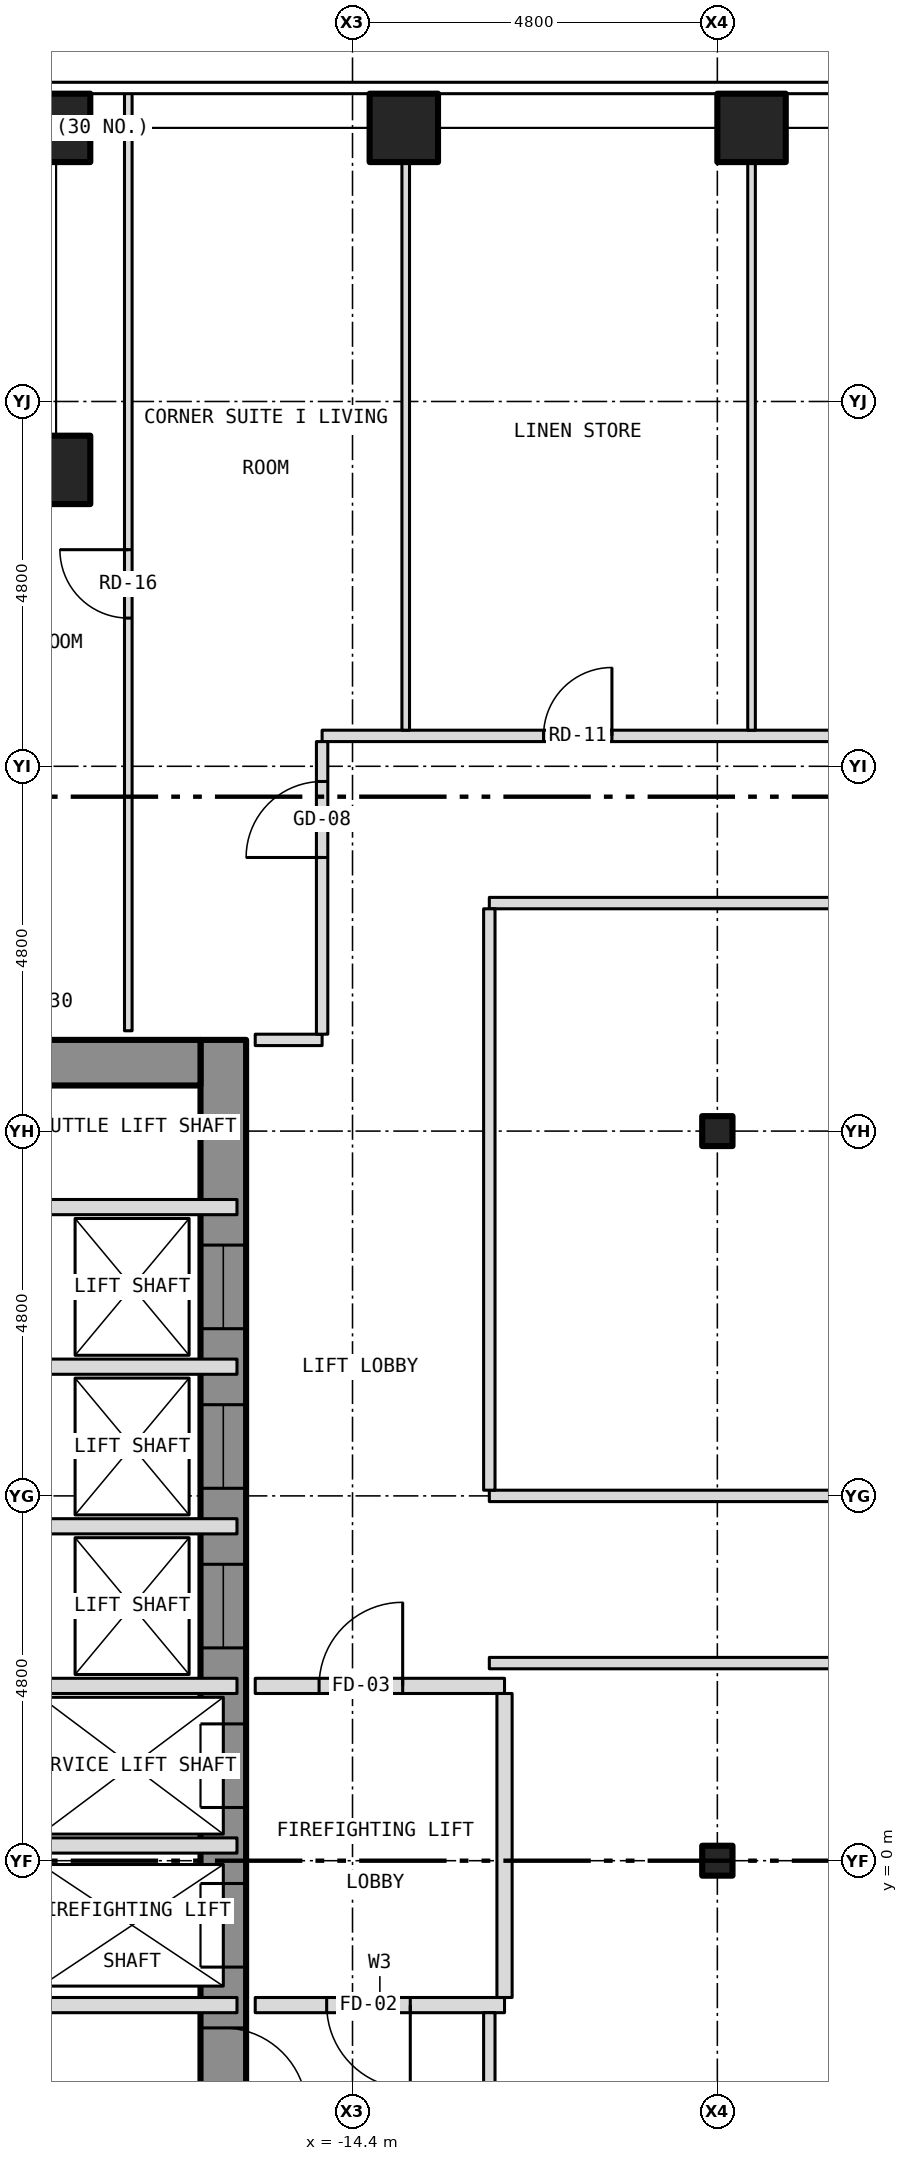
"""IFC4 building model, lengths in metres.
Left out: names, types, materials, properties, quantities, classifications, styles, units other than length and angle.
Written with IfcOpenShell. Run it as: python <this file> out.ifc"""

import sys

from ifc_helpers import new_model, si_unit, direction, frame, frame_2d, origin, origin_2d, place, context, subcontext, project, spatial, rectangle, hollow_rectangle, i_section, extrude, element, fill, save


model = new_model("IFC4")
c1 = context("Model", 3, precision=1e-05, world=origin(), true_north=direction((0.0, 1.0)))
c2 = subcontext(c1, "Body", "Model", "MODEL_VIEW")
j1 = project(units=[si_unit("LENGTHUNIT", "METRE"), si_unit("PLANEANGLEUNIT", "RADIAN")], contexts=[c1])
p1 = place(None, origin())
s1 = spatial("IfcSite", under=j1, at=p1, CompositionType="ELEMENT")
p2 = place(p1, origin())
s2 = spatial("IfcBuilding", under=s1, at=p2, CompositionType="ELEMENT")
p3 = place(p2, frame((0.0, 0.0, 110.0)))
s3 = spatial("IfcBuildingStorey", under=s2, at=p3, CompositionType="ELEMENT", Elevation=110.0)
for number, where, z_axis, x_axis in (
    (1, (-18.3, 22.8, -0.15), (0.0, 0.0, 1.0), (1.0, 0.0, 0.0)),
    (2, (-13.725, 22.8, -0.15), (0.0, 0.0, 1.0), (1.0, 0.0, 0.0)),
    (3, (-9.15, 22.8, -0.15), (0.0, 0.0, 1.0), (1.0, 0.0, 0.0)),
    (4, (-18.3, 18.3, -0.15), (0.0, 0.0, 1.0), (1.0, 0.0, 0.0)),
):
    element("IfcColumn", number, at=place(p3, frame(where, z_axis=z_axis, x_axis=x_axis)), inside=s3, PredefinedType="COLUMN", context=c2, shape_type="SweptSolid", body=[
        extrude(hollow_rectangle(XDim=0.9, YDim=0.9, WallThickness=0.05, at=origin_2d()), origin(), (0.0, 0.0, 1.0), 3.5),
    ])
for number, where, z_axis, x_axis in (
    (5, (-9.6, 0.0, -0.15), (0.0, 0.0, 1.0), (1.0, 0.0, 0.0)),
    (6, (-9.6, 9.6, -0.15), (0.0, 0.0, 1.0), (1.0, 0.0, 0.0)),
):
    element("IfcColumn", number, at=place(p3, frame(where, z_axis=z_axis, x_axis=x_axis)), inside=s3, PredefinedType="COLUMN", context=c2, shape_type="SweptSolid", body=[
        extrude(i_section(OverallWidth=0.399, OverallDepth=0.394, WebThickness=0.023, FlangeThickness=0.037, at=origin_2d()), origin(), (0.0, 0.0, 1.0), 3.5),
    ])
p4 = place(p3, frame((-16.1, -10.8, 0.0), z_axis=(0.0, 0.0, 1.0), x_axis=(0.0, 1.0, 0.0)))
e7 = element("IfcWall", 7, at=p4, inside=s3, PredefinedType="SHEAR", context=c2, shape_type="SweptSolid", body=[
    extrude(rectangle(XDim=21.6, YDim=0.6, at=frame_2d((10.8, 0.0))), origin(), (0.0, 0.0, 1.0), 3.25),
])
p5 = place(p4, frame((9.4, 0.0, 0.0)))
e8 = element("IfcOpeningElement", 8, at=p5, cuts=e7, PredefinedType="OPENING", context=c2, shape_type="SweptSolid", body=[
    extrude(rectangle(XDim=1.1, YDim=2.1, at=frame_2d((0.55, 1.05))), frame((0.0, 0.312, 0.0), z_axis=(0.0, -1.0, 0.0), x_axis=(1.0, 0.0, 0.0)), (0.0, 0.0, 1.0), 0.624),
])
p6 = place(p4, frame((11.5, 0.0, 0.0)))
e9 = element("IfcOpeningElement", 9, at=p6, cuts=e7, PredefinedType="OPENING", context=c2, shape_type="SweptSolid", body=[
    extrude(rectangle(XDim=1.1, YDim=2.1, at=frame_2d((0.55, 1.05))), frame((0.0, 0.312, 0.0), z_axis=(0.0, -1.0, 0.0), x_axis=(1.0, 0.0, 0.0)), (0.0, 0.0, 1.0), 0.624),
])
p7 = place(p4, frame((13.6, 0.0, 0.0)))
e10 = element("IfcOpeningElement", 10, at=p7, cuts=e7, PredefinedType="OPENING", context=c2, shape_type="SweptSolid", body=[
    extrude(rectangle(XDim=1.1, YDim=2.1, at=frame_2d((0.55, 1.05))), frame((0.0, 0.312, 0.0), z_axis=(0.0, -1.0, 0.0), x_axis=(1.0, 0.0, 0.0)), (0.0, 0.0, 1.0), 0.624),
])
p8 = place(p4, frame((15.7, 0.0, 0.0)))
e11 = element("IfcOpeningElement", 11, at=p8, cuts=e7, PredefinedType="OPENING", context=c2, shape_type="SweptSolid", body=[
    extrude(rectangle(XDim=1.1, YDim=2.1, at=frame_2d((0.55, 1.05))), frame((0.0, 0.312, 0.0), z_axis=(0.0, -1.0, 0.0), x_axis=(1.0, 0.0, 0.0)), (0.0, 0.0, 1.0), 0.624),
])
p9 = place(p4, frame((17.8, 0.0, 0.0)))
e12 = element("IfcOpeningElement", 12, at=p9, cuts=e7, PredefinedType="OPENING", context=c2, shape_type="SweptSolid", body=[
    extrude(rectangle(XDim=1.1, YDim=2.1, at=frame_2d((0.55, 1.05))), frame((0.0, 0.312, 0.0), z_axis=(0.0, -1.0, 0.0), x_axis=(1.0, 0.0, 0.0)), (0.0, 0.0, 1.0), 0.624),
])
p10 = place(p4, frame((0.758, 0.0, 0.0)))
e13 = element("IfcOpeningElement", 13, at=p10, cuts=e7, PredefinedType="OPENING", context=c2, shape_type="SweptSolid", body=[
    extrude(rectangle(XDim=1.1, YDim=2.1, at=frame_2d((0.55, 1.05))), frame((0.0, 0.312, 0.0), z_axis=(0.0, -1.0, 0.0), x_axis=(1.0, 0.0, 0.0)), (0.0, 0.0, 1.0), 0.624),
])
p11 = place(p4, frame((7.5, 0.0, 0.0)))
e14 = element("IfcOpeningElement", 14, at=p11, cuts=e7, PredefinedType="OPENING", context=c2, shape_type="SweptSolid", body=[
    extrude(rectangle(XDim=1.1, YDim=2.1, at=frame_2d((0.55, 1.05))), frame((0.0, 0.312, 0.0), z_axis=(0.0, -1.0, 0.0), x_axis=(1.0, 0.0, 0.0)), (0.0, 0.0, 1.0), 0.624),
])
p12 = place(p3, frame((-22.2, 10.5, 0.0), z_axis=(0.0, 0.0, 1.0), x_axis=(1.0, 0.0, 0.0)))
e15 = element("IfcWall", 15, at=p12, inside=s3, PredefinedType="SHEAR", context=c2, shape_type="SweptSolid", body=[
    extrude(rectangle(XDim=5.8, YDim=0.6, at=frame_2d((2.9, 0.0))), origin(), (0.0, 0.0, 1.0), 3.25),
])
p13 = place(p3, frame((-22.68, -1.9, 0.0), z_axis=(0.0, 0.0, 1.0), x_axis=(1.0, 0.0, 0.0)))
e16 = element("IfcWall", 16, at=p13, inside=s3, PredefinedType="PARTITIONING", context=c2, shape_type="SweptSolid", body=[
    extrude(rectangle(XDim=6.76, YDim=0.2, at=frame_2d((3.38, 0.0))), origin(), (0.0, 0.0, 1.0), 3.25),
])
p14 = place(p13, frame((2.12, 0.0, 0.0)))
e17 = element("IfcOpeningElement", 17, at=p14, cuts=e16, PredefinedType="OPENING", context=c2, shape_type="SweptSolid", body=[
    extrude(rectangle(XDim=0.9, YDim=2.1, at=frame_2d((0.45, 1.05))), frame((0.0, 0.112, 0.0), z_axis=(0.0, -1.0, 0.0), x_axis=(1.0, 0.0, 0.0)), (0.0, 0.0, 1.0), 0.224),
])
p15 = place(p3, frame((-15.68, -1.9, 0.0), z_axis=(0.0, 0.0, 1.0), x_axis=(1.0, 0.0, 0.0)))
e18 = element("IfcWall", 18, at=p15, inside=s3, PredefinedType="PARTITIONING", context=c2, shape_type="SweptSolid", body=[
    extrude(rectangle(XDim=3.28, YDim=0.2, at=frame_2d((1.64, 0.0))), origin(), (0.0, 0.0, 1.0), 3.35),
])
p16 = place(p15, frame((0.94, 0.0, 0.0)))
e19 = element("IfcOpeningElement", 19, at=p16, cuts=e18, PredefinedType="OPENING", context=c2, shape_type="SweptSolid", body=[
    extrude(rectangle(XDim=1.1, YDim=2.1, at=frame_2d((0.55, 1.05))), frame((0.0, 0.112, 0.0), z_axis=(0.0, -1.0, 0.0), x_axis=(1.0, 0.0, 0.0)), (0.0, 0.0, 1.0), 0.224),
])
for number, where, z_axis, x_axis in (
    (20, (-18.8, 0.2, 0.0), (0.0, 0.0, 1.0), (1.0, 0.0, 0.0)),
    (21, (-18.8, 2.3, 0.0), (0.0, 0.0, 1.0), (1.0, 0.0, 0.0)),
):
    element("IfcWall", number, at=place(p3, frame(where, z_axis=z_axis, x_axis=x_axis)), inside=s3, PredefinedType="PARTITIONING", context=c2, shape_type="SweptSolid", body=[
        extrude(rectangle(XDim=2.88, YDim=0.2, at=frame_2d((1.44, 0.0))), origin(), (0.0, 0.0, 1.0), 3.25),
    ])
p17 = place(p3, frame((-15.68, 2.3, 0.0), z_axis=(0.0, 0.0, 1.0), x_axis=(1.0, 0.0, 0.0)))
e22 = element("IfcWall", 22, at=p17, inside=s3, PredefinedType="PARTITIONING", context=c2, shape_type="SweptSolid", body=[
    extrude(rectangle(XDim=3.28, YDim=0.2, at=frame_2d((1.64, 0.0))), origin(), (0.0, 0.0, 1.0), 3.35),
])
p18 = place(p17, frame((0.84, 0.0, 0.0)))
e23 = element("IfcOpeningElement", 23, at=p18, cuts=e22, PredefinedType="OPENING", context=c2, shape_type="SweptSolid", body=[
    extrude(rectangle(XDim=1.1, YDim=2.1, at=frame_2d((0.55, 1.05))), frame((0.0, 0.112, 0.0), z_axis=(0.0, -1.0, 0.0), x_axis=(1.0, 0.0, 0.0)), (0.0, 0.0, 1.0), 0.224),
])
p19 = place(p3, frame((-12.6, 2.6, 0.0), z_axis=(0.0, 0.0, 1.0), x_axis=(1.0, 0.0, 0.0)))
e24 = element("IfcWall", 24, at=p19, inside=s3, PredefinedType="PARTITIONING", context=c2, shape_type="SweptSolid", body=[
    extrude(rectangle(XDim=16.7, YDim=0.15, at=frame_2d((8.35, 0.0))), origin(), (0.0, 0.0, 1.0), 3.35),
])
p20 = place(p19, frame((5.85, 0.0, 0.0)))
e25 = element("IfcOpeningElement", 25, at=p20, cuts=e24, PredefinedType="OPENING", context=c2, shape_type="SweptSolid", body=[
    extrude(rectangle(XDim=0.9, YDim=2.1, at=frame_2d((0.45, 1.05))), frame((0.0, 0.087, 0.0), z_axis=(0.0, -1.0, 0.0), x_axis=(1.0, 0.0, 0.0)), (0.0, 0.0, 1.0), 0.174),
])
p21 = place(p3, frame((-18.8, 4.4, 0.0), z_axis=(0.0, 0.0, 1.0), x_axis=(1.0, 0.0, 0.0)))
e26 = element("IfcWall", 26, at=p21, inside=s3, PredefinedType="PARTITIONING", context=c2, shape_type="SweptSolid", body=[
    extrude(rectangle(XDim=2.88, YDim=0.2, at=frame_2d((1.44, 0.0))), origin(), (0.0, 0.0, 1.0), 3.25),
])
p22 = place(p3, frame((-12.6, 4.8, 0.0), z_axis=(0.0, 0.0, 1.0), x_axis=(1.0, 0.0, 0.0)))
e27 = element("IfcWall", 27, at=p22, inside=s3, PredefinedType="PARTITIONING", context=c2, shape_type="SweptSolid", body=[
    extrude(rectangle(XDim=16.7, YDim=0.15, at=frame_2d((8.35, 0.0))), origin(), (0.0, 0.0, 1.0), 3.35),
])
p23 = place(p22, frame((14.2, 0.0, 0.0)))
e28 = element("IfcOpeningElement", 28, at=p23, cuts=e27, PredefinedType="OPENING", context=c2, shape_type="SweptSolid", body=[
    extrude(rectangle(XDim=0.9, YDim=2.1, at=frame_2d((0.45, 1.05))), frame((0.0, 0.087, 0.0), z_axis=(0.0, -1.0, 0.0), x_axis=(1.0, 0.0, 0.0)), (0.0, 0.0, 1.0), 0.174),
])
for number, where, z_axis, x_axis in (
    (29, (-18.8, 6.5, 0.0), (0.0, 0.0, 1.0), (1.0, 0.0, 0.0)),
    (30, (-18.8, 8.6, 0.0), (0.0, 0.0, 1.0), (1.0, 0.0, 0.0)),
):
    element("IfcWall", number, at=place(p3, frame(where, z_axis=z_axis, x_axis=x_axis)), inside=s3, PredefinedType="PARTITIONING", context=c2, shape_type="SweptSolid", body=[
        extrude(rectangle(XDim=2.88, YDim=0.2, at=frame_2d((1.44, 0.0))), origin(), (0.0, 0.0, 1.0), 3.25),
    ])
p24 = place(p3, frame((-15.68, 10.8, 0.0), z_axis=(0.0, 0.0, 1.0), x_axis=(1.0, 0.0, 0.0)))
e31 = element("IfcWall", 31, at=p24, inside=s3, PredefinedType="PARTITIONING", context=c2, shape_type="SweptSolid", body=[
    extrude(rectangle(XDim=0.88, YDim=0.15, at=frame_2d((0.44, 0.0))), origin(), (0.0, 0.0, 1.0), 3.35),
])
p25 = place(p3, frame((-12.6, 12.6, 0.0), z_axis=(0.0, 0.0, 1.0), x_axis=(1.0, 0.0, 0.0)))
e32 = element("IfcWall", 32, at=p25, inside=s3, PredefinedType="PARTITIONING", context=c2, shape_type="SweptSolid", body=[
    extrude(rectangle(XDim=16.7, YDim=0.15, at=frame_2d((8.35, 0.0))), origin(), (0.0, 0.0, 1.0), 3.35),
])
p26 = place(p25, frame((14.2, 0.0, 0.0)))
e33 = element("IfcOpeningElement", 33, at=p26, cuts=e32, PredefinedType="OPENING", context=c2, shape_type="SweptSolid", body=[
    extrude(rectangle(XDim=0.9, YDim=2.1, at=frame_2d((0.45, 1.05))), frame((0.0, 0.087, 0.0), z_axis=(0.0, -1.0, 0.0), x_axis=(1.0, 0.0, 0.0)), (0.0, 0.0, 1.0), 0.174),
])
p27 = place(p25, frame((5.85, 0.0, 0.0)))
e34 = element("IfcOpeningElement", 34, at=p27, cuts=e32, PredefinedType="OPENING", context=c2, shape_type="SweptSolid", body=[
    extrude(rectangle(XDim=0.9, YDim=2.1, at=frame_2d((0.45, 1.05))), frame((0.0, 0.087, 0.0), z_axis=(0.0, -1.0, 0.0), x_axis=(1.0, 0.0, 0.0)), (0.0, 0.0, 1.0), 0.174),
])
p28 = place(p3, frame((-14.8, 14.8, 0.0), z_axis=(0.0, 0.0, 1.0), x_axis=(1.0, 0.0, 0.0)))
e35 = element("IfcWall", 35, at=p28, inside=s3, PredefinedType="PARTITIONING", context=c2, shape_type="SweptSolid", body=[
    extrude(rectangle(XDim=29.6, YDim=0.15, at=frame_2d((14.8, 0.0))), origin(), (0.0, 0.0, 1.0), 3.35),
])
p29 = place(p28, frame((2.913, 0.0, 0.0)))
e36 = element("IfcOpeningElement", 36, at=p29, cuts=e35, PredefinedType="OPENING", context=c2, shape_type="SweptSolid", body=[
    extrude(rectangle(XDim=0.9, YDim=2.1, at=frame_2d((0.45, 1.05))), frame((0.0, 0.087, 0.0), z_axis=(0.0, -1.0, 0.0), x_axis=(1.0, 0.0, 0.0)), (0.0, 0.0, 1.0), 0.174),
])
p30 = place(p28, frame((7.481, 0.0, 0.0)))
e37 = element("IfcOpeningElement", 37, at=p30, cuts=e35, PredefinedType="OPENING", context=c2, shape_type="SweptSolid", body=[
    extrude(rectangle(XDim=1.0, YDim=2.1, at=frame_2d((0.5, 1.05))), frame((0.0, 0.087, 0.0), z_axis=(0.0, -1.0, 0.0), x_axis=(1.0, 0.0, 0.0)), (0.0, 0.0, 1.0), 0.174),
])
p31 = place(p28, frame((19.104, 0.0, 0.0)))
e38 = element("IfcOpeningElement", 38, at=p31, cuts=e35, PredefinedType="OPENING", context=c2, shape_type="SweptSolid", body=[
    extrude(rectangle(XDim=1.0, YDim=2.1, at=frame_2d((0.5, 1.05))), frame((0.0, 0.087, 0.0), z_axis=(0.0, -1.0, 0.0), x_axis=(1.0, 0.0, 0.0)), (0.0, 0.0, 1.0), 0.174),
])
p32 = place(p28, frame((23.494, 0.0, 0.0)))
e39 = element("IfcOpeningElement", 39, at=p32, cuts=e35, PredefinedType="OPENING", context=c2, shape_type="SweptSolid", body=[
    extrude(rectangle(XDim=1.0, YDim=2.1, at=frame_2d((0.5, 1.05))), frame((0.0, 0.087, 0.0), z_axis=(0.0, -1.0, 0.0), x_axis=(1.0, 0.0, 0.0)), (0.0, 0.0, 1.0), 0.174),
])
p33 = place(p3, frame((-17.35, 10.92, 0.0), z_axis=(0.0, 0.0, 1.0), x_axis=(0.0, 1.0, 0.0)))
e40 = element("IfcWall", 40, at=p33, inside=s3, PredefinedType="PARTITIONING", context=c2, shape_type="SweptSolid", body=[
    extrude(rectangle(XDim=12.36, YDim=0.1, at=frame_2d((6.18, 0.0))), origin(), (0.0, 0.0, 1.0), 3.35),
])
p34 = place(p33, frame((5.43, 0.0, 0.0)))
e41 = element("IfcOpeningElement", 41, at=p34, cuts=e40, PredefinedType="OPENING", context=c2, shape_type="SweptSolid", body=[
    extrude(rectangle(XDim=0.9, YDim=2.1, at=frame_2d((0.45, 1.05))), frame((0.0, 0.062, 0.0), z_axis=(0.0, -1.0, 0.0), x_axis=(1.0, 0.0, 0.0)), (0.0, 0.0, 1.0), 0.124),
])
p35 = place(p3, frame((-14.8, 10.875, 0.0), z_axis=(0.0, 0.0, 1.0), x_axis=(0.0, 1.0, 0.0)))
e42 = element("IfcWall", 42, at=p35, inside=s3, PredefinedType="PARTITIONING", context=c2, shape_type="SweptSolid", body=[
    extrude(rectangle(XDim=3.85, YDim=0.15, at=frame_2d((1.925, 0.0))), origin(), (0.0, 0.0, 1.0), 3.35),
])
p36 = place(p35, frame((2.325, 0.0, 0.0)))
e43 = element("IfcOpeningElement", 43, at=p36, cuts=e42, PredefinedType="OPENING", context=c2, shape_type="SweptSolid", body=[
    extrude(rectangle(XDim=1.0, YDim=2.1, at=frame_2d((0.5, 1.05))), frame((0.0, 0.087, 0.0), z_axis=(0.0, -1.0, 0.0), x_axis=(1.0, 0.0, 0.0)), (0.0, 0.0, 1.0), 0.174),
])
p37 = place(p3, frame((-13.7, 14.875, 0.0), z_axis=(0.0, 0.0, 1.0), x_axis=(0.0, 1.0, 0.0)))
e44 = element("IfcWall", 44, at=p37, inside=s3, PredefinedType="PARTITIONING", context=c2, shape_type="SweptSolid", body=[
    extrude(rectangle(XDim=7.805, YDim=0.1, at=frame_2d((3.902, 0.0))), origin(), (0.0, 0.0, 1.0), 3.35),
])
p38 = place(p3, frame((-12.6, -12.525, 0.0), z_axis=(0.0, 0.0, 1.0), x_axis=(0.0, 1.0, 0.0)))
e45 = element("IfcWall", 45, at=p38, inside=s3, PredefinedType="PARTITIONING", context=c2, shape_type="SweptSolid", body=[
    extrude(rectangle(XDim=10.525, YDim=0.15, at=frame_2d((5.262, 0.0))), origin(), (0.0, 0.0, 1.0), 3.35),
])
p39 = place(p3, frame((-12.6, 4.875, 0.0), z_axis=(0.0, 0.0, 1.0), x_axis=(0.0, 1.0, 0.0)))
e46 = element("IfcWall", 46, at=p39, inside=s3, PredefinedType="PARTITIONING", context=c2, shape_type="SweptSolid", body=[
    extrude(rectangle(XDim=7.65, YDim=0.15, at=frame_2d((3.825, 0.0))), origin(), (0.0, 0.0, 1.0), 3.35),
])
p40 = place(p3, frame((-12.4, -1.8, 0.0), z_axis=(0.0, 0.0, 1.0), x_axis=(0.0, 1.0, 0.0)))
e47 = element("IfcWall", 47, at=p40, inside=s3, PredefinedType="PARTITIONING", context=c2, shape_type="SweptSolid", body=[
    extrude(rectangle(XDim=4.0, YDim=0.2, at=frame_2d((2.0, 0.0))), origin(), (0.0, 0.0, 1.0), 3.35),
])
p41 = place(p3, frame((-9.15, 14.875, 0.0), z_axis=(0.0, 0.0, 1.0), x_axis=(0.0, 1.0, 0.0)))
e48 = element("IfcWall", 48, at=p41, inside=s3, PredefinedType="PARTITIONING", context=c2, shape_type="SweptSolid", body=[
    extrude(rectangle(XDim=7.805, YDim=0.1, at=frame_2d((3.902, 0.0))), origin(), (0.0, 0.0, 1.0), 3.35),
])
p42 = place(p5, origin())
e49 = element("IfcDoor", 49, at=p42, inside=s3, OperationType="SLIDING_TO_LEFT", PredefinedType="DOOR", context=c2, shape_type="SweptSolid", body=[
    extrude(rectangle(XDim=1.1, YDim=2.1, at=frame_2d((0.55, 1.05))), frame((0.0, 0.025, 0.0), z_axis=(0.0, -1.0, 0.0), x_axis=(1.0, 0.0, 0.0)), (0.0, 0.0, 1.0), 0.05),
])
fill(e8, e49)
p43 = place(p6, origin())
e50 = element("IfcDoor", 50, at=p43, inside=s3, OperationType="SLIDING_TO_LEFT", PredefinedType="DOOR", context=c2, shape_type="SweptSolid", body=[
    extrude(rectangle(XDim=1.1, YDim=2.1, at=frame_2d((0.55, 1.05))), frame((0.0, 0.025, 0.0), z_axis=(0.0, -1.0, 0.0), x_axis=(1.0, 0.0, 0.0)), (0.0, 0.0, 1.0), 0.05),
])
fill(e9, e50)
p44 = place(p7, origin())
e51 = element("IfcDoor", 51, at=p44, inside=s3, OperationType="SLIDING_TO_LEFT", PredefinedType="DOOR", context=c2, shape_type="SweptSolid", body=[
    extrude(rectangle(XDim=1.1, YDim=2.1, at=frame_2d((0.55, 1.05))), frame((0.0, 0.025, 0.0), z_axis=(0.0, -1.0, 0.0), x_axis=(1.0, 0.0, 0.0)), (0.0, 0.0, 1.0), 0.05),
])
fill(e10, e51)
p45 = place(p8, origin())
e52 = element("IfcDoor", 52, at=p45, inside=s3, OperationType="SLIDING_TO_LEFT", PredefinedType="DOOR", context=c2, shape_type="SweptSolid", body=[
    extrude(rectangle(XDim=1.1, YDim=2.1, at=frame_2d((0.55, 1.05))), frame((0.0, 0.025, 0.0), z_axis=(0.0, -1.0, 0.0), x_axis=(1.0, 0.0, 0.0)), (0.0, 0.0, 1.0), 0.05),
])
fill(e11, e52)
p46 = place(p9, origin())
e53 = element("IfcDoor", 53, at=p46, inside=s3, OperationType="SLIDING_TO_LEFT", PredefinedType="DOOR", context=c2, shape_type="SweptSolid", body=[
    extrude(rectangle(XDim=1.1, YDim=2.1, at=frame_2d((0.55, 1.05))), frame((0.0, 0.025, 0.0), z_axis=(0.0, -1.0, 0.0), x_axis=(1.0, 0.0, 0.0)), (0.0, 0.0, 1.0), 0.05),
])
fill(e12, e53)
p47 = place(p11, origin())
e54 = element("IfcDoor", 54, at=p47, inside=s3, OperationType="SINGLE_SWING_LEFT", PredefinedType="DOOR", context=c2, shape_type="SweptSolid", body=[
    extrude(rectangle(XDim=1.1, YDim=2.1, at=frame_2d((0.55, 1.05))), frame((0.0, 0.025, 0.0), z_axis=(0.0, -1.0, 0.0), x_axis=(1.0, 0.0, 0.0)), (0.0, 0.0, 1.0), 0.05),
])
fill(e14, e54)
p48 = place(p16, origin())
e55 = element("IfcDoor", 55, at=p48, inside=s3, OperationType="SINGLE_SWING_RIGHT", PredefinedType="DOOR", context=c2, shape_type="SweptSolid", body=[
    extrude(rectangle(XDim=1.1, YDim=2.1, at=frame_2d((0.55, 1.05))), frame((0.0, 0.025, 0.0), z_axis=(0.0, -1.0, 0.0), x_axis=(1.0, 0.0, 0.0)), (0.0, 0.0, 1.0), 0.05),
])
fill(e19, e55)
p49 = place(p18, origin())
e56 = element("IfcDoor", 56, at=p49, inside=s3, OperationType="SINGLE_SWING_RIGHT", PredefinedType="DOOR", context=c2, shape_type="SweptSolid", body=[
    extrude(rectangle(XDim=1.1, YDim=2.1, at=frame_2d((0.55, 1.05))), frame((0.0, 0.025, 0.0), z_axis=(0.0, -1.0, 0.0), x_axis=(1.0, 0.0, 0.0)), (0.0, 0.0, 1.0), 0.05),
])
fill(e23, e56)
p50 = place(p29, origin())
e57 = element("IfcDoor", 57, at=p50, inside=s3, OperationType="SINGLE_SWING_RIGHT", PredefinedType="DOOR", context=c2, shape_type="SweptSolid", body=[
    extrude(rectangle(XDim=0.9, YDim=2.1, at=frame_2d((0.45, 1.05))), frame((0.0, 0.025, 0.0), z_axis=(0.0, -1.0, 0.0), x_axis=(1.0, 0.0, 0.0)), (0.0, 0.0, 1.0), 0.05),
])
fill(e36, e57)
p51 = place(p36, origin())
e58 = element("IfcDoor", 58, at=p51, inside=s3, OperationType="SINGLE_SWING_LEFT", PredefinedType="DOOR", context=c2, shape_type="SweptSolid", body=[
    extrude(rectangle(XDim=1.0, YDim=2.1, at=frame_2d((0.5, 1.05))), frame((0.0, 0.025, 0.0), z_axis=(0.0, -1.0, 0.0), x_axis=(1.0, 0.0, 0.0)), (0.0, 0.0, 1.0), 0.05),
])
fill(e43, e58)
p52 = place(p34, origin())
e59 = element("IfcDoor", 59, at=p52, inside=s3, OperationType="SINGLE_SWING_RIGHT", PredefinedType="DOOR", context=c2, shape_type="SweptSolid", body=[
    extrude(rectangle(XDim=0.9, YDim=2.1, at=frame_2d((0.45, 1.05))), frame((0.0, 0.025, 0.0), z_axis=(0.0, -1.0, 0.0), x_axis=(1.0, 0.0, 0.0)), (0.0, 0.0, 1.0), 0.05),
])
fill(e41, e59)
save(model, sys.argv[1])
